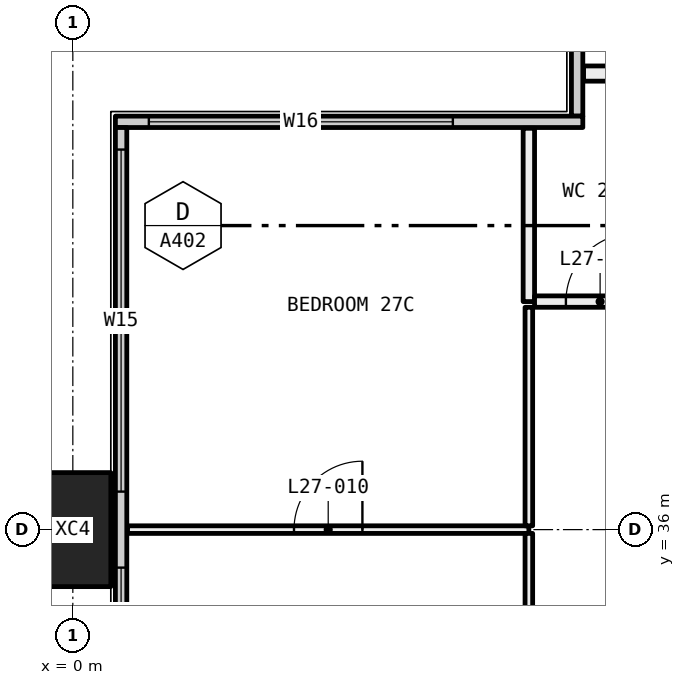
"""IFC4 building model, lengths in metres.
Left out: names, types, materials, properties, quantities, classifications, styles, units other than length and angle.
Written with IfcOpenShell. Run it as: python <this file> out.ifc"""

import sys

from ifc_helpers import new_model, si_unit, direction, frame, frame_2d, origin, origin_2d, place, context, subcontext, project, spatial, rectangle, hollow_rectangle, extrude, element, fill, save


model = new_model("IFC4")
c1 = context("Model", 3, precision=1e-05, world=origin(), true_north=direction((0.0, 1.0)))
c2 = subcontext(c1, "Body", "Model", "MODEL_VIEW")
j1 = project(units=[si_unit("LENGTHUNIT", "METRE"), si_unit("PLANEANGLEUNIT", "RADIAN")], contexts=[c1])
p1 = place(None, origin())
s1 = spatial("IfcSite", under=j1, at=p1, CompositionType="ELEMENT")
p2 = place(p1, origin())
s2 = spatial("IfcBuilding", under=s1, at=p2, CompositionType="ELEMENT")
p3 = place(p2, frame((0.0, 0.0, 106.95)))
s3 = spatial("IfcBuildingStorey", under=s2, at=p3, CompositionType="ELEMENT", Elevation=106.95)
p4 = place(p3, frame((0.0, 36.0, -0.4), z_axis=(0.0, 0.0, 1.0), x_axis=(0.0, 1.0, 0.0)))
e1 = element("IfcColumn", 1, at=p4, inside=s3, PredefinedType="COLUMN", context=c2, shape_type="SweptSolid", body=[
    extrude(hollow_rectangle(XDim=1.5, YDim=1.0, WallThickness=0.06, at=origin_2d()), origin(), (0.0, 0.0, 1.0), 3.45),
])
p5 = place(p3, frame((6.635, 41.44, 0.0), z_axis=(0.0, 0.0, 1.0), x_axis=(0.0, 1.0, 0.0)))
e2 = element("IfcWall", 2, at=p5, inside=s3, PredefinedType="ELEMENTEDWALL", context=c2, shape_type="SweptSolid", body=[
    extrude(rectangle(XDim=5.85, YDim=0.15, at=frame_2d((2.925, 0.0))), origin(), (0.0, 0.0, 1.0), 3.05),
])
p6 = place(p5, frame((1.56, 0.0, 0.45)))
e3 = element("IfcOpeningElement", 3, at=p6, cuts=e2, PredefinedType="OPENING", context=c2, shape_type="SweptSolid", body=[
    extrude(rectangle(XDim=4.0, YDim=2.55, at=frame_2d((2.0, 1.275))), frame((0.0, 0.085, 0.0), z_axis=(0.0, -1.0, 0.0), x_axis=(1.0, 0.0, 0.0)), (0.0, 0.0, 1.0), 0.17),
])
p7 = place(p3, frame((0.56, 41.365, 0.0), z_axis=(0.0, 0.0, 1.0), x_axis=(1.0, 0.0, 0.0)))
e4 = element("IfcWall", 4, at=p7, inside=s3, PredefinedType="ELEMENTEDWALL", context=c2, shape_type="SweptSolid", body=[
    extrude(rectangle(XDim=6.15, YDim=0.15, at=frame_2d((3.075, 0.0))), origin(), (0.0, 0.0, 1.0), 3.05),
])
p8 = place(p7, frame((0.44, 0.0, 0.45)))
e5 = element("IfcOpeningElement", 5, at=p8, cuts=e4, PredefinedType="OPENING", context=c2, shape_type="SweptSolid", body=[
    extrude(rectangle(XDim=4.0, YDim=2.55, at=frame_2d((2.0, 1.275))), frame((0.0, 0.085, 0.0), z_axis=(0.0, -1.0, 0.0), x_axis=(1.0, 0.0, 0.0)), (0.0, 0.0, 1.0), 0.17),
])
p9 = place(p3, frame((0.635, 18.71, 0.0), z_axis=(0.0, 0.0, 1.0), x_axis=(0.0, 1.0, 0.0)))
e6 = element("IfcWall", 6, at=p9, inside=s3, PredefinedType="ELEMENTEDWALL", context=c2, shape_type="SweptSolid", body=[
    extrude(rectangle(XDim=22.58, YDim=0.15, at=frame_2d((11.29, 0.0))), origin(), (0.0, 0.0, 1.0), 3.05),
])
p10 = place(p9, frame((0.29, 0.0, 0.45)))
e7 = element("IfcOpeningElement", 7, at=p10, cuts=e6, PredefinedType="OPENING", context=c2, shape_type="SweptSolid", body=[
    extrude(rectangle(XDim=4.5, YDim=2.55, at=frame_2d((2.25, 1.275))), frame((0.0, 0.085, 0.0), z_axis=(0.0, -1.0, 0.0), x_axis=(1.0, 0.0, 0.0)), (0.0, 0.0, 1.0), 0.17),
])
p11 = place(p9, frame((5.79, 0.0, 0.45)))
e8 = element("IfcOpeningElement", 8, at=p11, cuts=e6, PredefinedType="OPENING", context=c2, shape_type="SweptSolid", body=[
    extrude(rectangle(XDim=1.25, YDim=2.55, at=frame_2d((0.625, 1.275))), frame((0.0, 0.085, 0.0), z_axis=(0.0, -1.0, 0.0), x_axis=(1.0, 0.0, 0.0)), (0.0, 0.0, 1.0), 0.17),
])
p12 = place(p9, frame((15.54, 0.0, 0.45)))
e9 = element("IfcOpeningElement", 9, at=p12, cuts=e6, PredefinedType="OPENING", context=c2, shape_type="SweptSolid", body=[
    extrude(rectangle(XDim=1.25, YDim=2.55, at=frame_2d((0.625, 1.275))), frame((0.0, 0.085, 0.0), z_axis=(0.0, -1.0, 0.0), x_axis=(1.0, 0.0, 0.0)), (0.0, 0.0, 1.0), 0.17),
])
p13 = place(p9, frame((17.79, 0.0, 0.45)))
e10 = element("IfcOpeningElement", 10, at=p13, cuts=e6, PredefinedType="OPENING", context=c2, shape_type="SweptSolid", body=[
    extrude(rectangle(XDim=4.5, YDim=2.55, at=frame_2d((2.25, 1.275))), frame((0.0, 0.085, 0.0), z_axis=(0.0, -1.0, 0.0), x_axis=(1.0, 0.0, 0.0)), (0.0, 0.0, 1.0), 0.17),
])
p14 = place(p3, frame((6.0, 36.0, 0.0), z_axis=(0.0, 0.0, 1.0), x_axis=(-1.0, 0.0, 0.0)))
e11 = element("IfcWall", 11, at=p14, inside=s3, PredefinedType="PARTITIONING", context=c2, shape_type="SweptSolid", body=[
    extrude(rectangle(XDim=5.28, YDim=0.1, at=frame_2d((2.64, 0.0))), origin(), (0.0, 0.0, 1.0), 2.45),
])
p15 = place(p14, frame((2.19, 0.0, 0.0)))
e12 = element("IfcOpeningElement", 12, at=p15, cuts=e11, PredefinedType="OPENING", context=c2, shape_type="SweptSolid", body=[
    extrude(rectangle(XDim=0.9, YDim=2.1, at=frame_2d((0.45, 1.05))), frame((0.0, 0.06, 0.0), z_axis=(0.0, -1.0, 0.0), x_axis=(1.0, 0.0, 0.0)), (0.0, 0.0, 1.0), 0.12),
])
p16 = place(p3, frame((6.0, 25.5, 0.0), z_axis=(0.0, 0.0, 1.0), x_axis=(0.0, 1.0, 0.0)))
e13 = element("IfcWall", 13, at=p16, inside=s3, PredefinedType="PARTITIONING", context=c2, shape_type="SweptSolid", body=[
    extrude(rectangle(XDim=10.45, YDim=0.1, at=frame_2d((5.225, 0.0))), origin(), (0.0, 0.0, 1.0), 2.45),
])
p17 = place(p3, frame((6.0, 36.05, 0.0), z_axis=(0.0, 0.0, 1.0), x_axis=(0.0, 1.0, 0.0)))
e14 = element("IfcWall", 14, at=p17, inside=s3, PredefinedType="PARTITIONING", context=c2, shape_type="SweptSolid", body=[
    extrude(rectangle(XDim=2.875, YDim=0.1, at=frame_2d((1.438, 0.0))), origin(), (0.0, 0.0, 1.0), 2.45),
])
p18 = place(p3, frame((6.0, 39.0, 0.0), z_axis=(0.0, 0.0, 1.0), x_axis=(0.0, 1.0, 0.0)))
e15 = element("IfcWall", 15, at=p18, inside=s3, PredefinedType="PARTITIONING", context=c2, shape_type="SweptSolid", body=[
    extrude(rectangle(XDim=2.28, YDim=0.15, at=frame_2d((1.14, 0.0))), origin(), (0.0, 0.0, 1.0), 3.05),
])
p19 = place(p3, frame((7.8, 39.0, 0.0), z_axis=(0.0, 0.0, 1.0), x_axis=(-1.0, 0.0, 0.0)))
e16 = element("IfcWall", 16, at=p19, inside=s3, PredefinedType="PARTITIONING", context=c2, shape_type="SweptSolid", body=[
    extrude(rectangle(XDim=1.725, YDim=0.15, at=frame_2d((0.863, 0.0))), origin(), (0.0, 0.0, 1.0), 3.05),
])
p20 = place(p19, frame((0.413, 0.0, 0.0)))
e17 = element("IfcOpeningElement", 17, at=p20, cuts=e16, PredefinedType="OPENING", context=c2, shape_type="SweptSolid", body=[
    extrude(rectangle(XDim=0.9, YDim=2.1, at=frame_2d((0.45, 1.05))), frame((0.0, 0.085, 0.0), z_axis=(0.0, -1.0, 0.0), x_axis=(1.0, 0.0, 0.0)), (0.0, 0.0, 1.0), 0.17),
])
p21 = place(p3, frame((7.8, 42.0, 0.0), z_axis=(0.0, 0.0, 1.0), x_axis=(-1.0, 0.0, 0.0)))
e18 = element("IfcWall", 18, at=p21, inside=s3, PredefinedType="PARTITIONING", context=c2, shape_type="SweptSolid", body=[
    extrude(rectangle(XDim=1.08, YDim=0.2, at=frame_2d((0.54, 0.0))), origin(), (0.0, 0.0, 1.0), 3.05),
])
p22 = place(p8, origin())
e19 = element("IfcWindow", 19, at=p22, inside=s3, PartitioningType="SINGLE_PANEL", PredefinedType="WINDOW", context=c2, shape_type="SweptSolid", body=[
    extrude(rectangle(XDim=4.0, YDim=2.55, at=frame_2d((2.0, 1.275))), frame((0.0, 0.03, 0.0), z_axis=(0.0, -1.0, 0.0), x_axis=(1.0, 0.0, 0.0)), (0.0, 0.0, 1.0), 0.06),
])
fill(e5, e19)
p23 = place(p12, origin())
e20 = element("IfcWindow", 20, at=p23, inside=s3, PartitioningType="SINGLE_PANEL", PredefinedType="WINDOW", context=c2, shape_type="SweptSolid", body=[
    extrude(rectangle(XDim=1.25, YDim=2.55, at=frame_2d((0.625, 1.275))), frame((0.0, 0.03, 0.0), z_axis=(0.0, -1.0, 0.0), x_axis=(1.0, 0.0, 0.0)), (0.0, 0.0, 1.0), 0.06),
])
fill(e9, e20)
p24 = place(p13, origin())
e21 = element("IfcWindow", 21, at=p24, inside=s3, PartitioningType="SINGLE_PANEL", PredefinedType="WINDOW", context=c2, shape_type="SweptSolid", body=[
    extrude(rectangle(XDim=4.5, YDim=2.55, at=frame_2d((2.25, 1.275))), frame((0.0, 0.03, 0.0), z_axis=(0.0, -1.0, 0.0), x_axis=(1.0, 0.0, 0.0)), (0.0, 0.0, 1.0), 0.06),
])
fill(e10, e21)
p25 = place(p15, frame((0.9, 0.0, 0.0), x_axis=(-1.0, 0.0, 0.0)))
e22 = element("IfcDoor", 22, at=p25, inside=s3, OperationType="SINGLE_SWING_LEFT", PredefinedType="DOOR", context=c2, shape_type="SweptSolid", body=[
    extrude(rectangle(XDim=0.9, YDim=2.1, at=frame_2d((0.45, 1.05))), frame((0.0, 0.025, 0.0), z_axis=(0.0, -1.0, 0.0), x_axis=(1.0, 0.0, 0.0)), (0.0, 0.0, 1.0), 0.05),
])
fill(e12, e22)
p26 = place(p20, frame((0.9, 0.0, 0.0), x_axis=(-1.0, 0.0, 0.0)))
e23 = element("IfcDoor", 23, at=p26, inside=s3, OperationType="SINGLE_SWING_LEFT", PredefinedType="DOOR", context=c2, shape_type="SweptSolid", body=[
    extrude(rectangle(XDim=0.9, YDim=2.1, at=frame_2d((0.45, 1.05))), frame((0.0, 0.025, 0.0), z_axis=(0.0, -1.0, 0.0), x_axis=(1.0, 0.0, 0.0)), (0.0, 0.0, 1.0), 0.05),
])
fill(e17, e23)
save(model, sys.argv[1])
